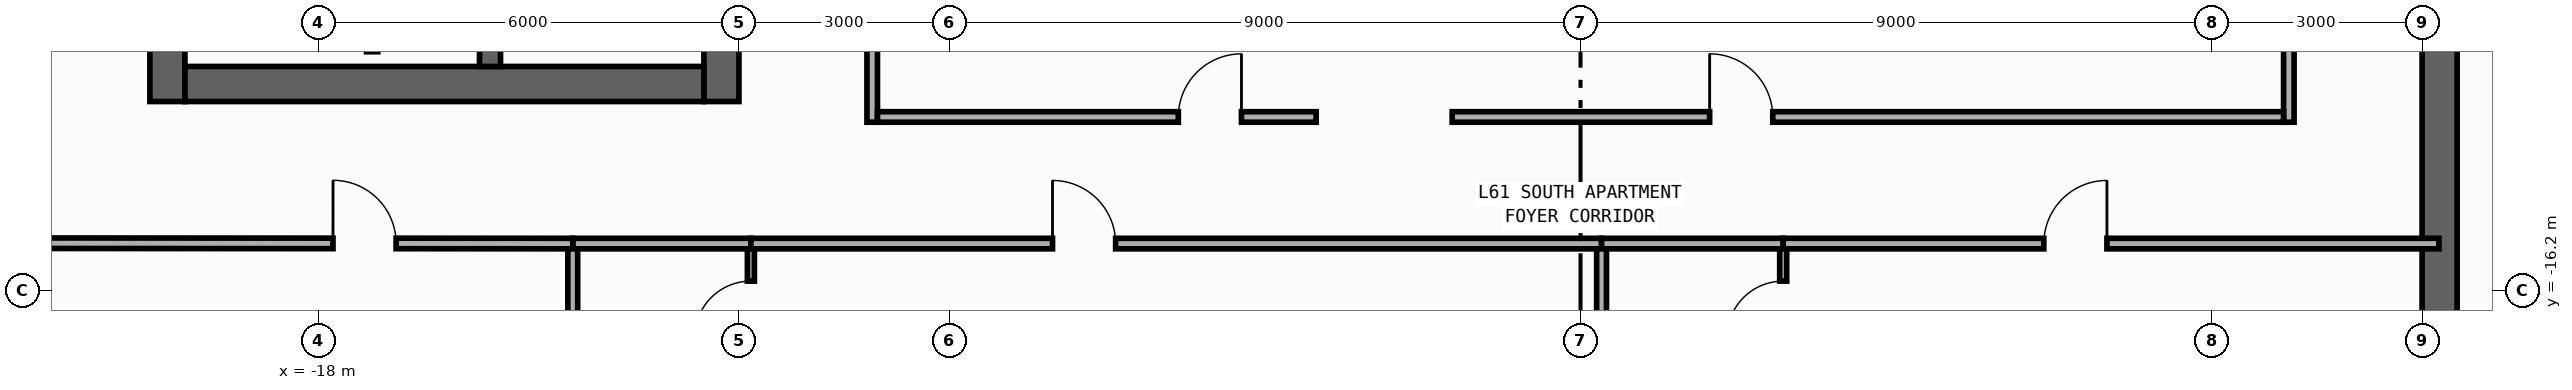
"""IFC4 building model, lengths in metres.
Left out: names, types, materials, properties, quantities, classifications, styles, units other than length and angle.
Written with IfcOpenShell. Run it as: python <this file> out.ifc"""

import sys

from ifc_helpers import new_model, si_unit, direction, frame, frame_2d, origin, place, context, subcontext, project, spatial, rectangle, extrude, element, fill, save


model = new_model("IFC4")
c1 = context("Model", 3, precision=1e-05, world=origin(), true_north=direction((0.0, 1.0)))
c2 = subcontext(c1, "Body", "Model", "MODEL_VIEW")
j1 = project(units=[si_unit("LENGTHUNIT", "METRE"), si_unit("PLANEANGLEUNIT", "RADIAN")], contexts=[c1])
p1 = place(None, origin())
s1 = spatial("IfcSite", under=j1, at=p1, CompositionType="ELEMENT")
p2 = place(p1, origin())
s2 = spatial("IfcBuilding", under=s1, at=p2, CompositionType="ELEMENT")
p3 = place(p2, frame((0.0, 0.0, 258.4)))
s3 = spatial("IfcBuildingStorey", under=s2, at=p3, CompositionType="ELEMENT", Elevation=258.4)
p4 = place(p3, frame((-20.15, -13.5, 0.0), z_axis=(0.0, 0.0, 1.0), x_axis=(0.0, 1.0, 0.0)))
e1 = element("IfcWall", 1, at=p4, inside=s3, PredefinedType="SHEAR", context=c2, shape_type="SweptSolid", body=[
    extrude(rectangle(XDim=27.0, YDim=0.5, at=frame_2d((13.5, 0.0))), origin(), (0.0, 0.0, 1.0), 3.34),
])
p5 = place(p3, frame((-12.25, -13.5, 0.0), z_axis=(0.0, 0.0, 1.0), x_axis=(0.0, 1.0, 0.0)))
e2 = element("IfcWall", 2, at=p5, inside=s3, PredefinedType="SHEAR", context=c2, shape_type="SweptSolid", body=[
    extrude(rectangle(XDim=27.0, YDim=0.5, at=frame_2d((13.5, 0.0))), origin(), (0.0, 0.0, 1.0), 3.34),
])
p6 = place(p5, frame((15.175, 0.0, 0.0)))
e3 = element("IfcOpeningElement", 3, at=p6, cuts=e2, PredefinedType="OPENING", context=c2, shape_type="SweptSolid", body=[
    extrude(rectangle(XDim=0.85, YDim=2.1, at=frame_2d((0.425, 1.05))), frame((0.0, 0.26, 0.0), z_axis=(0.0, -1.0, 0.0), x_axis=(1.0, 0.0, 0.0)), (0.0, 0.0, 1.0), 0.52),
])
p7 = place(p5, frame((21.275, 0.0, 0.0)))
e4 = element("IfcOpeningElement", 4, at=p7, cuts=e2, PredefinedType="OPENING", context=c2, shape_type="SweptSolid", body=[
    extrude(rectangle(XDim=0.85, YDim=2.1, at=frame_2d((0.425, 1.05))), frame((0.0, 0.26, 0.0), z_axis=(0.0, -1.0, 0.0), x_axis=(1.0, 0.0, 0.0)), (0.0, 0.0, 1.0), 0.52),
])
p8 = place(p5, frame((4.275, 0.0, 0.0)))
e5 = element("IfcOpeningElement", 5, at=p8, cuts=e2, PredefinedType="OPENING", context=c2, shape_type="SweptSolid", body=[
    extrude(rectangle(XDim=0.85, YDim=2.1, at=frame_2d((0.425, 1.05))), frame((0.0, 0.26, 0.0), z_axis=(0.0, -1.0, 0.0), x_axis=(1.0, 0.0, 0.0)), (0.0, 0.0, 1.0), 0.52),
])
p9 = place(p5, frame((10.275, 0.0, 0.0)))
e6 = element("IfcOpeningElement", 6, at=p9, cuts=e2, PredefinedType="OPENING", context=c2, shape_type="SweptSolid", body=[
    extrude(rectangle(XDim=0.85, YDim=2.1, at=frame_2d((0.425, 1.05))), frame((0.0, 0.26, 0.0), z_axis=(0.0, -1.0, 0.0), x_axis=(1.0, 0.0, 0.0)), (0.0, 0.0, 1.0), 0.52),
])
p10 = place(p5, frame((12.725, 0.0, 0.0)))
e7 = element("IfcOpeningElement", 7, at=p10, cuts=e2, PredefinedType="OPENING", context=c2, shape_type="SweptSolid", body=[
    extrude(rectangle(XDim=1.15, YDim=2.2, at=frame_2d((0.575, 1.1))), frame((0.0, 0.26, 0.0), z_axis=(0.0, -1.0, 0.0), x_axis=(1.0, 0.0, 0.0)), (0.0, 0.0, 1.0), 0.52),
])
p11 = place(p5, frame((1.625, 0.0, 0.0)))
e8 = element("IfcOpeningElement", 8, at=p11, cuts=e2, PredefinedType="OPENING", context=c2, shape_type="SweptSolid", body=[
    extrude(rectangle(XDim=0.85, YDim=2.1, at=frame_2d((0.425, 1.05))), frame((0.0, 0.26, 0.0), z_axis=(0.0, -1.0, 0.0), x_axis=(1.0, 0.0, 0.0)), (0.0, 0.0, 1.0), 0.52),
])
p12 = place(p3, frame((-19.9, -13.25, 0.0), z_axis=(0.0, 0.0, 1.0), x_axis=(1.0, 0.0, 0.0)))
e9 = element("IfcWall", 9, at=p12, inside=s3, PredefinedType="SHEAR", context=c2, shape_type="SweptSolid", body=[
    extrude(rectangle(XDim=7.4, YDim=0.5, at=frame_2d((3.7, 0.0))), origin(), (0.0, 0.0, 1.0), 3.34),
])
p13 = place(p3, frame((-15.55, -13.0, 0.0), z_axis=(0.0, 0.0, 1.0), x_axis=(0.0, 1.0, 0.0)))
e10 = element("IfcWall", 10, at=p13, inside=s3, PredefinedType="SHEAR", context=c2, shape_type="SweptSolid", body=[
    extrude(rectangle(XDim=26.0, YDim=0.3, at=frame_2d((13.0, 0.0))), origin(), (0.0, 0.0, 1.0), 3.34),
])
p14 = place(p13, frame((12.225, 0.0, 0.0)))
e11 = element("IfcOpeningElement", 11, at=p14, cuts=e10, PredefinedType="OPENING", context=c2, shape_type="SweptSolid", body=[
    extrude(rectangle(XDim=1.15, YDim=2.2, at=frame_2d((0.575, 1.1))), frame((0.0, 0.16, 0.0), z_axis=(0.0, -1.0, 0.0), x_axis=(1.0, 0.0, 0.0)), (0.0, 0.0, 1.0), 0.32),
])
p15 = place(p13, frame((1.125, 0.0, 0.0)))
e12 = element("IfcOpeningElement", 12, at=p15, cuts=e10, PredefinedType="OPENING", context=c2, shape_type="SweptSolid", body=[
    extrude(rectangle(XDim=0.85, YDim=2.1, at=frame_2d((0.425, 1.05))), frame((0.0, 0.16, 0.0), z_axis=(0.0, -1.0, 0.0), x_axis=(1.0, 0.0, 0.0)), (0.0, 0.0, 1.0), 0.32),
])
p16 = place(p3, frame((12.25, -19.8, 0.0), z_axis=(0.0, 0.0, 1.0), x_axis=(0.0, 1.0, 0.0)))
e13 = element("IfcWall", 13, at=p16, inside=s3, PredefinedType="SHEAR", context=c2, shape_type="SweptSolid", body=[
    extrude(rectangle(XDim=27.0, YDim=0.5, at=frame_2d((13.5, 0.0))), origin(), (0.0, 0.0, 1.0), 3.34),
])
p17 = place(p16, frame((23.05, 0.0, 0.0)))
e14 = element("IfcOpeningElement", 14, at=p17, cuts=e13, PredefinedType="OPENING", context=c2, shape_type="SweptSolid", body=[
    extrude(rectangle(XDim=1.1, YDim=2.2, at=frame_2d((0.55, 1.1))), frame((0.0, 0.26, 0.0), z_axis=(0.0, -1.0, 0.0), x_axis=(1.0, 0.0, 0.0)), (0.0, 0.0, 1.0), 0.52),
])
p18 = place(p16, frame((19.85, 0.0, 0.0)))
e15 = element("IfcOpeningElement", 15, at=p18, cuts=e13, PredefinedType="OPENING", context=c2, shape_type="SweptSolid", body=[
    extrude(rectangle(XDim=1.1, YDim=2.2, at=frame_2d((0.55, 1.1))), frame((0.0, 0.26, 0.0), z_axis=(0.0, -1.0, 0.0), x_axis=(1.0, 0.0, 0.0)), (0.0, 0.0, 1.0), 0.52),
])
p19 = place(p16, frame((16.65, 0.0, 0.0)))
e16 = element("IfcOpeningElement", 16, at=p19, cuts=e13, PredefinedType="OPENING", context=c2, shape_type="SweptSolid", body=[
    extrude(rectangle(XDim=1.1, YDim=2.2, at=frame_2d((0.55, 1.1))), frame((0.0, 0.26, 0.0), z_axis=(0.0, -1.0, 0.0), x_axis=(1.0, 0.0, 0.0)), (0.0, 0.0, 1.0), 0.52),
])
p20 = place(p16, frame((10.175, 0.0, 0.0)))
e17 = element("IfcOpeningElement", 17, at=p20, cuts=e13, PredefinedType="OPENING", context=c2, shape_type="SweptSolid", body=[
    extrude(rectangle(XDim=0.85, YDim=2.1, at=frame_2d((0.425, 1.05))), frame((0.0, 0.26, 0.0), z_axis=(0.0, -1.0, 0.0), x_axis=(1.0, 0.0, 0.0)), (0.0, 0.0, 1.0), 0.52),
])
p21 = place(p16, frame((12.725, 0.0, 0.0)))
e18 = element("IfcOpeningElement", 18, at=p21, cuts=e13, PredefinedType="OPENING", context=c2, shape_type="SweptSolid", body=[
    extrude(rectangle(XDim=1.15, YDim=2.2, at=frame_2d((0.575, 1.1))), frame((0.0, 0.26, 0.0), z_axis=(0.0, -1.0, 0.0), x_axis=(1.0, 0.0, 0.0)), (0.0, 0.0, 1.0), 0.52),
])
p22 = place(p16, frame((25.125, 0.0, 0.0)))
e19 = element("IfcOpeningElement", 19, at=p22, cuts=e13, PredefinedType="OPENING", context=c2, shape_type="SweptSolid", body=[
    extrude(rectangle(XDim=0.85, YDim=2.1, at=frame_2d((0.425, 1.05))), frame((0.0, 0.26, 0.0), z_axis=(0.0, -1.0, 0.0), x_axis=(1.0, 0.0, 0.0)), (0.0, 0.0, 1.0), 0.52),
])
p23 = place(p3, frame((-10.1, -13.795, 0.0), z_axis=(0.0, 0.0, 1.0), x_axis=(0.0, 1.0, 0.0)))
e20 = element("IfcWall", 20, at=p23, inside=s3, PredefinedType="PARTITIONING", context=c2, shape_type="SweptSolid", body=[
    extrude(rectangle(XDim=10.205, YDim=0.15, at=frame_2d((5.103, 0.0))), origin(), (0.0, 0.0, 1.0), 3.34),
])
p24 = place(p23, frame((8.027, 0.0, 0.0)))
e21 = element("IfcOpeningElement", 21, at=p24, cuts=e20, PredefinedType="OPENING", context=c2, shape_type="SweptSolid", body=[
    extrude(rectangle(XDim=0.9, YDim=2.15, at=frame_2d((0.45, 1.075))), frame((0.0, 0.085, 0.0), z_axis=(0.0, -1.0, 0.0), x_axis=(1.0, 0.0, 0.0)), (0.0, 0.0, 1.0), 0.17),
])
p25 = place(p3, frame((10.1, -13.795, 0.0), z_axis=(0.0, 0.0, 1.0), x_axis=(0.0, 1.0, 0.0)))
e22 = element("IfcWall", 22, at=p25, inside=s3, PredefinedType="PARTITIONING", context=c2, shape_type="SweptSolid", body=[
    extrude(rectangle(XDim=7.575, YDim=0.15, at=frame_2d((3.788, 0.0))), origin(), (0.0, 0.0, 1.0), 3.34),
])
p26 = place(p25, frame((6.215, 0.0, 0.0)))
e23 = element("IfcOpeningElement", 23, at=p26, cuts=e22, PredefinedType="OPENING", context=c2, shape_type="SweptSolid", body=[
    extrude(rectangle(XDim=0.9, YDim=2.15, at=frame_2d((0.45, 1.075))), frame((0.0, 0.085, 0.0), z_axis=(0.0, -1.0, 0.0), x_axis=(1.0, 0.0, 0.0)), (0.0, 0.0, 1.0), 0.17),
])
p27 = place(p3, frame((-14.37, -15.525, 0.0), z_axis=(0.0, 0.0, 1.0), x_axis=(1.0, 0.0, 0.0)))
e24 = element("IfcWall", 24, at=p27, inside=s3, PredefinedType="PARTITIONING", context=c2, shape_type="SweptSolid", body=[
    extrude(rectangle(XDim=2.54, YDim=0.15, at=frame_2d((1.27, 0.0))), origin(), (0.0, 0.0, 1.0), 3.34),
])
p28 = place(p3, frame((-11.83, -15.525, 0.0), z_axis=(0.0, 0.0, 1.0), x_axis=(1.0, 0.0, 0.0)))
e25 = element("IfcWall", 25, at=p28, inside=s3, PredefinedType="PARTITIONING", context=c2, shape_type="SweptSolid", body=[
    extrude(rectangle(XDim=12.13, YDim=0.15, at=frame_2d((6.065, 0.0))), origin(), (0.0, 0.0, 1.0), 3.34),
])
p29 = place(p28, frame((4.301, 0.0, 0.0)))
e26 = element("IfcOpeningElement", 26, at=p29, cuts=e25, PredefinedType="OPENING", context=c2, shape_type="SweptSolid", body=[
    extrude(rectangle(XDim=0.9, YDim=2.15, at=frame_2d((0.45, 1.075))), frame((0.0, 0.085, 0.0), z_axis=(0.0, -1.0, 0.0), x_axis=(1.0, 0.0, 0.0)), (0.0, 0.0, 1.0), 0.17),
])
p30 = place(p3, frame((0.3, -15.525, 0.0), z_axis=(0.0, 0.0, 1.0), x_axis=(1.0, 0.0, 0.0)))
e27 = element("IfcWall", 27, at=p30, inside=s3, PredefinedType="PARTITIONING", context=c2, shape_type="SweptSolid", body=[
    extrude(rectangle(XDim=2.59, YDim=0.15, at=frame_2d((1.295, 0.0))), origin(), (0.0, 0.0, 1.0), 3.34),
])
p31 = place(p3, frame((2.89, -15.525, 0.0), z_axis=(0.0, 0.0, 1.0), x_axis=(1.0, 0.0, 0.0)))
e28 = element("IfcWall", 28, at=p31, inside=s3, PredefinedType="PARTITIONING", context=c2, shape_type="SweptSolid", body=[
    extrude(rectangle(XDim=9.35, YDim=0.15, at=frame_2d((4.675, 0.0))), origin(), (0.0, 0.0, 1.0), 3.34),
])
p32 = place(p31, frame((3.716, 0.0, 0.0)))
e29 = element("IfcOpeningElement", 29, at=p32, cuts=e28, PredefinedType="OPENING", context=c2, shape_type="SweptSolid", body=[
    extrude(rectangle(XDim=0.9, YDim=2.15, at=frame_2d((0.45, 1.075))), frame((0.0, 0.085, 0.0), z_axis=(0.0, -1.0, 0.0), x_axis=(1.0, 0.0, 0.0)), (0.0, 0.0, 1.0), 0.17),
])
p33 = place(p3, frame((-21.955, -15.52, 0.0), z_axis=(0.0, 0.0, 1.0), x_axis=(0.999999792794, -0.000643749062, 0.0)))
e30 = element("IfcWall", 30, at=p33, inside=s3, PredefinedType="PARTITIONING", context=c2, shape_type="SweptSolid", body=[
    extrude(rectangle(XDim=7.585, YDim=0.15, at=frame_2d((3.792, 0.0))), origin(), (0.0, 0.0, 1.0), 3.34),
])
p34 = place(p33, frame((4.166, 0.0, 0.0)))
e31 = element("IfcOpeningElement", 31, at=p34, cuts=e30, PredefinedType="OPENING", context=c2, shape_type="SweptSolid", body=[
    extrude(rectangle(XDim=0.9, YDim=2.15, at=frame_2d((0.45, 1.075))), frame((0.0, 0.085, 0.0), z_axis=(0.0, -1.0, 0.0), x_axis=(1.0, 0.0, 0.0)), (0.0, 0.0, 1.0), 0.17),
])
p35 = place(p3, frame((-10.025, -13.72, 0.0), z_axis=(0.0, 0.0, 1.0), x_axis=(1.0, 0.0, 0.0)))
e32 = element("IfcWall", 32, at=p35, inside=s3, PredefinedType="PARTITIONING", context=c2, shape_type="SweptSolid", body=[
    extrude(rectangle(XDim=6.255, YDim=0.15, at=frame_2d((3.127, 0.0))), origin(), (0.0, 0.0, 1.0), 3.34),
])
p36 = place(p35, frame((4.29, 0.0, 0.0)))
e33 = element("IfcOpeningElement", 33, at=p36, cuts=e32, PredefinedType="OPENING", context=c2, shape_type="SweptSolid", body=[
    extrude(rectangle(XDim=0.9, YDim=2.15, at=frame_2d((0.45, 1.075))), frame((0.0, 0.085, 0.0), z_axis=(0.0, -1.0, 0.0), x_axis=(1.0, 0.0, 0.0)), (0.0, 0.0, 1.0), 0.17),
])
p37 = place(p3, frame((-1.83, -13.72, 0.0), z_axis=(0.0, 0.0, 1.0), x_axis=(1.0, 0.0, 0.0)))
e34 = element("IfcWall", 34, at=p37, inside=s3, PredefinedType="PARTITIONING", context=c2, shape_type="SweptSolid", body=[
    extrude(rectangle(XDim=11.855, YDim=0.15, at=frame_2d((5.927, 0.0))), origin(), (0.0, 0.0, 1.0), 3.34),
])
p38 = place(p37, frame((3.671, 0.0, 0.0)))
e35 = element("IfcOpeningElement", 35, at=p38, cuts=e34, PredefinedType="OPENING", context=c2, shape_type="SweptSolid", body=[
    extrude(rectangle(XDim=0.9, YDim=2.15, at=frame_2d((0.45, 1.075))), frame((0.0, 0.085, 0.0), z_axis=(0.0, -1.0, 0.0), x_axis=(1.0, 0.0, 0.0)), (0.0, 0.0, 1.0), 0.17),
])
p39 = place(p3, frame((-11.83, -18.1, 0.0), z_axis=(0.0, 0.0, 1.0), x_axis=(0.0, 1.0, 0.0)))
e36 = element("IfcWall", 36, at=p39, inside=s3, PredefinedType="PARTITIONING", context=c2, shape_type="SweptSolid", body=[
    extrude(rectangle(XDim=2.5, YDim=0.1, at=frame_2d((1.25, 0.0))), origin(), (0.0, 0.0, 1.0), 3.34),
])
p40 = place(p39, frame((1.24, 0.0, 0.0)))
e37 = element("IfcOpeningElement", 37, at=p40, cuts=e36, PredefinedType="OPENING", context=c2, shape_type="SweptSolid", body=[
    extrude(rectangle(XDim=0.8, YDim=2.1, at=frame_2d((0.4, 1.05))), frame((0.0, 0.06, 0.0), z_axis=(0.0, -1.0, 0.0), x_axis=(1.0, 0.0, 0.0)), (0.0, 0.0, 1.0), 0.12),
])
for number, where, z_axis, x_axis in (
    (38, (-14.37, -18.1, 0.0), (0.0, 0.0, 1.0), (0.0, 1.0, 0.0)),
    (39, (0.3, -18.1, 0.0), (0.0, 0.0, 1.0), (0.0, 1.0, 0.0)),
):
    element("IfcWall", number, at=place(p3, frame(where, z_axis=z_axis, x_axis=x_axis)), inside=s3, PredefinedType="PARTITIONING", context=c2, shape_type="SweptSolid", body=[
        extrude(rectangle(XDim=2.5, YDim=0.14, at=frame_2d((1.25, 0.0))), origin(), (0.0, 0.0, 1.0), 3.34),
    ])
p41 = place(p3, frame((2.89, -18.1, 0.0), z_axis=(0.0, 0.0, 1.0), x_axis=(0.0, 1.0, 0.0)))
e40 = element("IfcWall", 40, at=p41, inside=s3, PredefinedType="PARTITIONING", context=c2, shape_type="SweptSolid", body=[
    extrude(rectangle(XDim=2.5, YDim=0.1, at=frame_2d((1.25, 0.0))), origin(), (0.0, 0.0, 1.0), 3.34),
])
p42 = place(p41, frame((1.24, 0.0, 0.0)))
e41 = element("IfcOpeningElement", 41, at=p42, cuts=e40, PredefinedType="OPENING", context=c2, shape_type="SweptSolid", body=[
    extrude(rectangle(XDim=0.8, YDim=2.1, at=frame_2d((0.4, 1.05))), frame((0.0, 0.06, 0.0), z_axis=(0.0, -1.0, 0.0), x_axis=(1.0, 0.0, 0.0)), (0.0, 0.0, 1.0), 0.12),
])
p43 = place(p29, origin())
e42 = element("IfcDoor", 42, at=p43, inside=s3, OperationType="SINGLE_SWING_LEFT", PredefinedType="DOOR", context=c2, shape_type="SweptSolid", body=[
    extrude(rectangle(XDim=0.9, YDim=2.15, at=frame_2d((0.45, 1.075))), frame((0.0, 0.025, 0.0), z_axis=(0.0, -1.0, 0.0), x_axis=(1.0, 0.0, 0.0)), (0.0, 0.0, 1.0), 0.05),
])
fill(e26, e42)
p44 = place(p32, origin())
e43 = element("IfcDoor", 43, at=p44, inside=s3, OperationType="SINGLE_SWING_RIGHT", PredefinedType="DOOR", context=c2, shape_type="SweptSolid", body=[
    extrude(rectangle(XDim=0.9, YDim=2.15, at=frame_2d((0.45, 1.075))), frame((0.0, 0.025, 0.0), z_axis=(0.0, -1.0, 0.0), x_axis=(1.0, 0.0, 0.0)), (0.0, 0.0, 1.0), 0.05),
])
fill(e29, e43)
p45 = place(p34, origin())
e44 = element("IfcDoor", 44, at=p45, inside=s3, OperationType="SINGLE_SWING_LEFT", PredefinedType="DOOR", context=c2, shape_type="SweptSolid", body=[
    extrude(rectangle(XDim=0.9, YDim=2.15, at=frame_2d((0.45, 1.075))), frame((0.0, 0.025, 0.0), z_axis=(0.0, -1.0, 0.0), x_axis=(1.0, 0.0, 0.0)), (0.0, 0.0, 1.0), 0.05),
])
fill(e31, e44)
p46 = place(p36, origin())
e45 = element("IfcDoor", 45, at=p46, inside=s3, OperationType="SINGLE_SWING_RIGHT", PredefinedType="DOOR", context=c2, shape_type="SweptSolid", body=[
    extrude(rectangle(XDim=0.9, YDim=2.15, at=frame_2d((0.45, 1.075))), frame((0.0, 0.025, 0.0), z_axis=(0.0, -1.0, 0.0), x_axis=(1.0, 0.0, 0.0)), (0.0, 0.0, 1.0), 0.05),
])
fill(e33, e45)
p47 = place(p38, origin())
e46 = element("IfcDoor", 46, at=p47, inside=s3, OperationType="SINGLE_SWING_LEFT", PredefinedType="DOOR", context=c2, shape_type="SweptSolid", body=[
    extrude(rectangle(XDim=0.9, YDim=2.15, at=frame_2d((0.45, 1.075))), frame((0.0, 0.025, 0.0), z_axis=(0.0, -1.0, 0.0), x_axis=(1.0, 0.0, 0.0)), (0.0, 0.0, 1.0), 0.05),
])
fill(e35, e46)
p48 = place(p40, origin())
e47 = element("IfcDoor", 47, at=p48, inside=s3, OperationType="SINGLE_SWING_LEFT", PredefinedType="DOOR", context=c2, shape_type="SweptSolid", body=[
    extrude(rectangle(XDim=0.8, YDim=2.1, at=frame_2d((0.4, 1.05))), frame((0.0, 0.025, 0.0), z_axis=(0.0, -1.0, 0.0), x_axis=(1.0, 0.0, 0.0)), (0.0, 0.0, 1.0), 0.05),
])
fill(e37, e47)
p49 = place(p42, origin())
e48 = element("IfcDoor", 48, at=p49, inside=s3, OperationType="SINGLE_SWING_LEFT", PredefinedType="DOOR", context=c2, shape_type="SweptSolid", body=[
    extrude(rectangle(XDim=0.8, YDim=2.1, at=frame_2d((0.4, 1.05))), frame((0.0, 0.025, 0.0), z_axis=(0.0, -1.0, 0.0), x_axis=(1.0, 0.0, 0.0)), (0.0, 0.0, 1.0), 0.05),
])
fill(e41, e48)
save(model, sys.argv[1])
